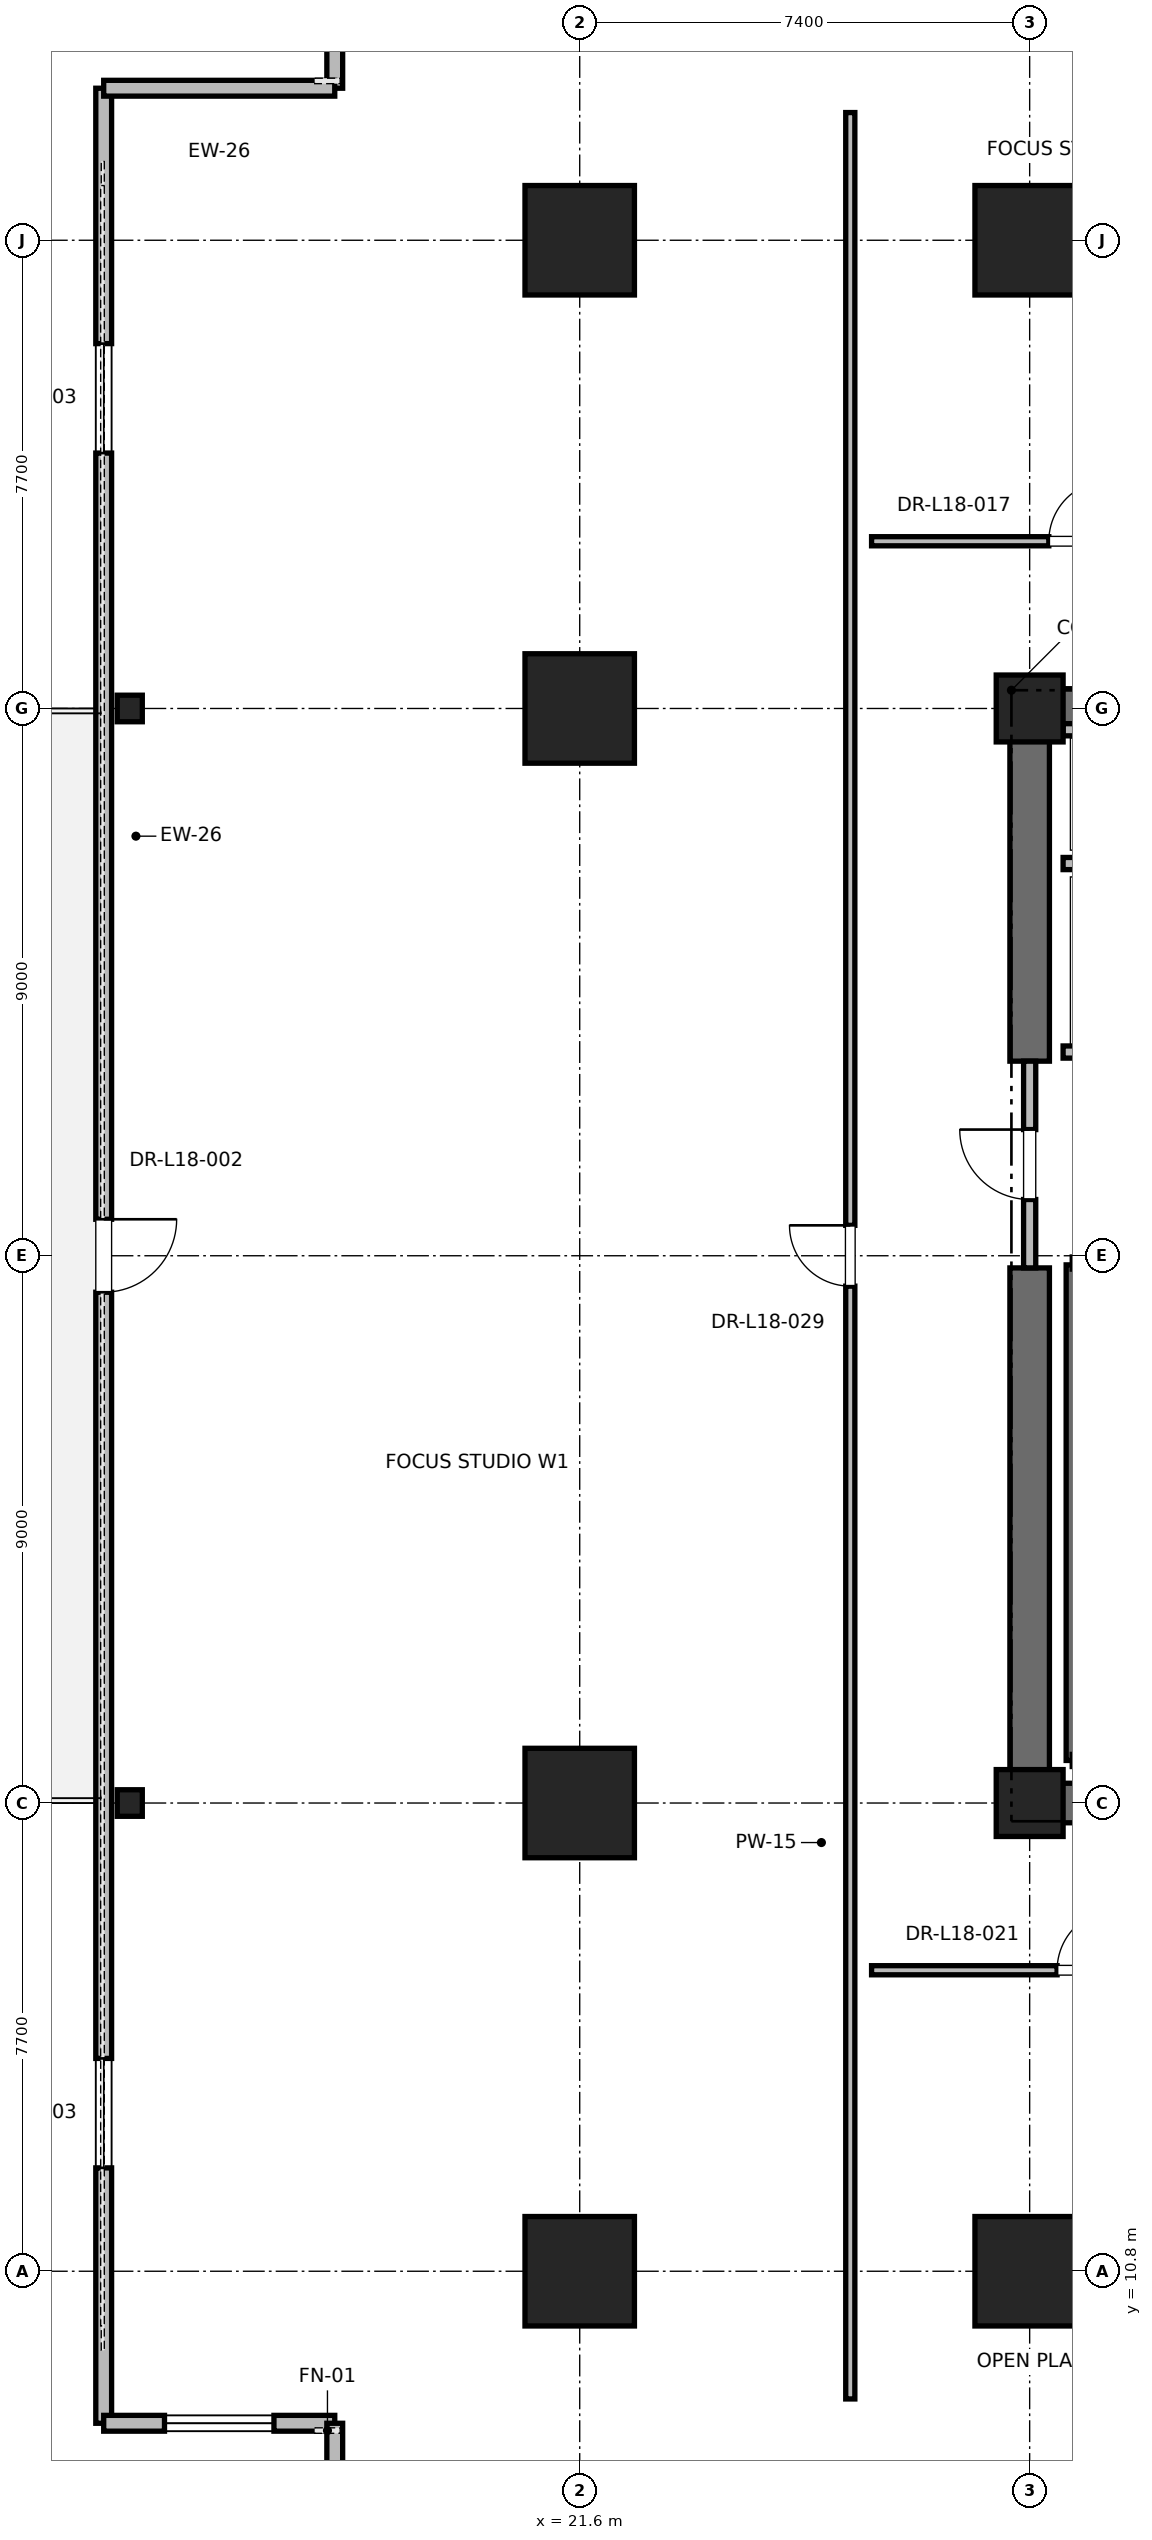
"""IFC4 building model, lengths in metres.
Left out: names, types, materials, properties, quantities, classifications, styles, units other than length and angle.
Written with IfcOpenShell. Run it as: python <this file> out.ifc"""

import sys

from ifc_helpers import new_model, si_unit, direction, frame, frame_2d, origin, origin_2d, place, context, subcontext, project, spatial, rectangle, i_section, extrude, element, fill, save


model = new_model("IFC4")
c1 = context("Model", 3, precision=1e-05, world=origin(), true_north=direction((0.0, 1.0)))
c2 = subcontext(c1, "Body", "Model", "MODEL_VIEW")
j1 = project(units=[si_unit("LENGTHUNIT", "METRE"), si_unit("PLANEANGLEUNIT", "RADIAN")], contexts=[c1])
p1 = place(None, origin())
s1 = spatial("IfcSite", under=j1, at=p1, CompositionType="ELEMENT")
p2 = place(p1, origin())
s2 = spatial("IfcBuilding", under=s1, at=p2, CompositionType="ELEMENT")
p3 = place(p2, frame((0.0, 0.0, 79.6)))
s3 = spatial("IfcBuildingStorey", under=s2, at=p3, CompositionType="ELEMENT", Elevation=79.6)
for number, where, z_axis, x_axis in (
    (1, (29.0, 10.8, 0.0), (0.0, 0.0, 1.0), (1.0, 0.0, 0.0)),
    (2, (29.0, 44.2, 0.0), (0.0, 0.0, 1.0), (1.0, 0.0, 0.0)),
    (3, (21.6, 18.5, 0.0), (0.0, 0.0, 1.0), (1.0, 0.0, 0.0)),
    (4, (21.6, 36.5, 0.0), (0.0, 0.0, 1.0), (1.0, 0.0, 0.0)),
    (5, (21.6, 10.8, 0.0), (0.0, 0.0, 1.0), (1.0, 0.0, 0.0)),
    (6, (21.6, 44.2, 0.0), (0.0, 0.0, 1.0), (1.0, 0.0, 0.0)),
):
    element("IfcColumn", number, at=place(p3, frame(where, z_axis=z_axis, x_axis=x_axis)), inside=s3, PredefinedType="COLUMN", context=c2, shape_type="SweptSolid", body=[
        extrude(rectangle(XDim=1.8, YDim=1.8, at=origin_2d()), origin(), (0.0, 0.0, 1.0), 4.0),
    ])
for number, where, z_axis, x_axis in (
    (7, (14.2, 18.5, 0.0), (0.0, 0.0, 1.0), (1.0, 0.0, 0.0)),
    (8, (14.2, 36.5, 0.0), (0.0, 0.0, 1.0), (1.0, 0.0, 0.0)),
):
    element("IfcColumn", number, at=place(p3, frame(where, z_axis=z_axis, x_axis=x_axis)), inside=s3, PredefinedType="COLUMN", context=c2, shape_type="SweptSolid", body=[
        extrude(i_section(OverallWidth=0.412, OverallDepth=0.437, WebThickness=0.036, FlangeThickness=0.058, FilletRadius=0.015, at=origin_2d()), origin(), (0.0, 0.0, 1.0), 4.0),
    ])
for number, where, z_axis, x_axis in (
    (9, (29.0, 18.5, 0.0), (0.0, 0.0, 1.0), (1.0, 0.0, 0.0)),
    (10, (29.0, 36.5, 0.0), (0.0, 0.0, 1.0), (1.0, 0.0, 0.0)),
):
    element("IfcColumn", number, at=place(p3, frame(where, z_axis=z_axis, x_axis=x_axis)), inside=s3, PredefinedType="PILASTER", context=c2, shape_type="SweptSolid", body=[
        extrude(rectangle(XDim=1.1, YDim=1.1, at=origin_2d()), origin(), (0.0, 0.0, 1.0), 4.0),
    ])
p4 = place(p3, frame((29.0, 18.5, 0.0), z_axis=(0.0, 0.0, 1.0), x_axis=(1.0, 0.0, 0.0)))
e11 = element("IfcWall", 11, at=p4, inside=s3, PredefinedType="SHEAR", context=c2, shape_type="SweptSolid", body=[
    extrude(rectangle(XDim=9.2, YDim=0.65, at=frame_2d((4.6, 0.0))), origin(), (0.0, 0.0, 1.0), 3.76),
])
p5 = place(p3, frame((29.0, 36.5, 0.0), z_axis=(0.0, 0.0, 1.0), x_axis=(1.0, 0.0, 0.0)))
e12 = element("IfcWall", 12, at=p5, inside=s3, PredefinedType="SHEAR", context=c2, shape_type="SweptSolid", body=[
    extrude(rectangle(XDim=5.8, YDim=0.65, at=frame_2d((2.9, 0.0))), origin(), (0.0, 0.0, 1.0), 3.76),
])
p6 = place(p3, frame((29.0, 18.5, 0.0), z_axis=(0.0, 0.0, 1.0), x_axis=(0.0, 1.0, 0.0)))
e13 = element("IfcWall", 13, at=p6, inside=s3, PredefinedType="SHEAR", context=c2, shape_type="SweptSolid", body=[
    extrude(rectangle(XDim=8.8, YDim=0.65, at=frame_2d((4.4, 0.0))), origin(), (0.0, 0.0, 1.0), 3.76),
])
p7 = place(p3, frame((29.0, 30.7, 0.0), z_axis=(0.0, 0.0, 1.0), x_axis=(0.0, 1.0, 0.0)))
e14 = element("IfcWall", 14, at=p7, inside=s3, PredefinedType="SHEAR", context=c2, shape_type="SweptSolid", body=[
    extrude(rectangle(XDim=5.8, YDim=0.65, at=frame_2d((2.9, 0.0))), origin(), (0.0, 0.0, 1.0), 3.76),
])
p8 = place(p3, frame((13.771, 46.7, 0.0), z_axis=(0.0, 0.0, 1.0), x_axis=(0.0, -1.0, 0.0)))
e15 = element("IfcWall", 15, at=p8, inside=s3, PredefinedType="PARAPET", context=c2, shape_type="SweptSolid", body=[
    extrude(rectangle(XDim=38.4, YDim=0.26, at=frame_2d((19.2, 0.0))), origin(), (0.0, 0.0, 1.0), 2.889),
])
p9 = place(p8, frame((4.2, 0.0, 0.85)))
e16 = element("IfcOpeningElement", 16, at=p9, cuts=e15, PredefinedType="OPENING", context=c2, shape_type="SweptSolid", body=[
    extrude(rectangle(XDim=1.8, YDim=2.2, at=frame_2d((0.9, 1.1))), frame((0.0, 0.13, 0.0), z_axis=(0.0, -1.0, 0.0), x_axis=(1.0, 0.0, 0.0)), (0.0, 0.0, 1.0), 0.26),
])
p10 = place(p8, frame((18.6, 0.0, 0.0)))
e17 = element("IfcOpeningElement", 17, at=p10, cuts=e15, PredefinedType="OPENING", context=c2, shape_type="SweptSolid", body=[
    extrude(rectangle(XDim=1.2, YDim=2.2, at=frame_2d((0.6, 1.1))), frame((0.0, 0.13, 0.0), z_axis=(0.0, -1.0, 0.0), x_axis=(1.0, 0.0, 0.0)), (0.0, 0.0, 1.0), 0.26),
])
p11 = place(p8, frame((32.4, 0.0, 0.85)))
e18 = element("IfcOpeningElement", 18, at=p11, cuts=e15, PredefinedType="OPENING", context=c2, shape_type="SweptSolid", body=[
    extrude(rectangle(XDim=1.8, YDim=2.2, at=frame_2d((0.9, 1.1))), frame((0.0, 0.13, 0.0), z_axis=(0.0, -1.0, 0.0), x_axis=(1.0, 0.0, 0.0)), (0.0, 0.0, 1.0), 0.26),
])
p12 = place(p3, frame((13.771, 8.3, 0.0), z_axis=(0.0, 0.0, 1.0), x_axis=(1.0, 0.0, 0.0)))
e19 = element("IfcWall", 19, at=p12, inside=s3, PredefinedType="PARAPET", context=c2, shape_type="SweptSolid", body=[
    extrude(rectangle(XDim=3.8, YDim=0.26, at=frame_2d((1.9, 0.0))), origin(), (0.0, 0.0, 1.0), 3.76),
])
p13 = place(p12, frame((1.0, 0.0, 0.85)))
e20 = element("IfcOpeningElement", 20, at=p13, cuts=e19, PredefinedType="OPENING", context=c2, shape_type="SweptSolid", body=[
    extrude(rectangle(XDim=1.8, YDim=2.2, at=frame_2d((0.9, 1.1))), frame((0.0, 0.13, 0.0), z_axis=(0.0, -1.0, 0.0), x_axis=(1.0, 0.0, 0.0)), (0.0, 0.0, 1.0), 0.26),
])
p14 = place(p3, frame((17.571, 8.3, 0.0), z_axis=(0.0, 0.0, 1.0), x_axis=(0.0, -1.0, 0.0)))
e21 = element("IfcWall", 21, at=p14, inside=s3, PredefinedType="PARAPET", context=c2, shape_type="SweptSolid", body=[
    extrude(rectangle(XDim=3.4, YDim=0.26, at=frame_2d((1.7, 0.0))), origin(), (0.0, 0.0, 1.0), 3.76),
])
p15 = place(p3, frame((17.571, 50.1, 0.0), z_axis=(0.0, 0.0, 1.0), x_axis=(0.0, -1.0, 0.0)))
e22 = element("IfcWall", 22, at=p15, inside=s3, PredefinedType="PARAPET", context=c2, shape_type="SweptSolid", body=[
    extrude(rectangle(XDim=3.4, YDim=0.26, at=frame_2d((1.7, 0.0))), origin(), (0.0, 0.0, 1.0), 3.76),
])
p16 = place(p15, frame((0.8, 0.0, 0.85)))
e23 = element("IfcOpeningElement", 23, at=p16, cuts=e22, PredefinedType="OPENING", context=c2, shape_type="SweptSolid", body=[
    extrude(rectangle(XDim=1.8, YDim=2.2, at=frame_2d((0.9, 1.1))), frame((0.0, 0.13, 0.0), z_axis=(0.0, -1.0, 0.0), x_axis=(1.0, 0.0, 0.0)), (0.0, 0.0, 1.0), 0.26),
])
p17 = place(p3, frame((17.571, 46.7, 0.0), z_axis=(0.0, 0.0, 1.0), x_axis=(-1.0, 0.0, 0.0)))
e24 = element("IfcWall", 24, at=p17, inside=s3, PredefinedType="PARAPET", context=c2, shape_type="SweptSolid", body=[
    extrude(rectangle(XDim=3.8, YDim=0.26, at=frame_2d((1.9, 0.0))), origin(), (0.0, 0.0, 1.0), 3.76),
])
p18 = place(p3, frame((29.7, 19.2, 0.0), z_axis=(0.0, 0.0, 1.0), x_axis=(0.0, 1.0, 0.0)))
e25 = element("IfcWall", 25, at=p18, inside=s3, PredefinedType="SOLIDWALL", context=c2, shape_type="SweptSolid", body=[
    extrude(rectangle(XDim=8.15, YDim=0.2, at=frame_2d((4.075, 0.0))), origin(), (0.0, 0.0, 1.0), 3.76),
])
p19 = place(p3, frame((29.0, 27.3, 0.0), z_axis=(0.0, 0.0, 1.0), x_axis=(0.0, 1.0, 0.0)))
e26 = element("IfcWall", 26, at=p19, inside=s3, PredefinedType="PARTITIONING", context=c2, shape_type="SweptSolid", body=[
    extrude(rectangle(XDim=3.4, YDim=0.2, at=frame_2d((1.7, 0.0))), origin(), (0.0, 0.0, 1.0), 2.54),
])
p20 = place(p19, frame((1.125, 0.0, 0.0)))
e27 = element("IfcOpeningElement", 27, at=p20, cuts=e26, PredefinedType="OPENING", context=c2, shape_type="SweptSolid", body=[
    extrude(rectangle(XDim=1.15, YDim=2.2, at=frame_2d((0.575, 1.1))), frame((0.0, 0.1, 0.0), z_axis=(0.0, -1.0, 0.0), x_axis=(1.0, 0.0, 0.0)), (0.0, 0.0, 1.0), 0.2),
])
p21 = place(p3, frame((29.55, 30.85, 0.0), z_axis=(0.0, 0.0, 1.0), x_axis=(1.0, 0.0, 0.0)))
e28 = element("IfcWall", 28, at=p21, inside=s3, PredefinedType="SOLIDWALL", context=c2, shape_type="SweptSolid", body=[
    extrude(rectangle(XDim=2.6, YDim=0.2, at=frame_2d((1.3, 0.0))), origin(), (0.0, 0.0, 1.0), 2.54),
])
p22 = place(p21, frame((0.75, 0.0, 0.0)))
e29 = element("IfcOpeningElement", 29, at=p22, cuts=e28, PredefinedType="OPENING", context=c2, shape_type="SweptSolid", body=[
    extrude(rectangle(XDim=1.1, YDim=2.2, at=frame_2d((0.55, 1.1))), frame((0.0, 0.1, 0.0), z_axis=(0.0, -1.0, 0.0), x_axis=(1.0, 0.0, 0.0)), (0.0, 0.0, 1.0), 0.2),
])
p23 = place(p3, frame((29.55, 33.95, 0.0), z_axis=(0.0, 0.0, 1.0), x_axis=(1.0, 0.0, 0.0)))
e30 = element("IfcWall", 30, at=p23, inside=s3, PredefinedType="SOLIDWALL", context=c2, shape_type="SweptSolid", body=[
    extrude(rectangle(XDim=2.8, YDim=0.2, at=frame_2d((1.4, 0.0))), origin(), (0.0, 0.0, 1.0), 3.76),
])
p24 = place(p3, frame((32.35, 36.15, 0.0), z_axis=(0.0, 0.0, 1.0), x_axis=(-1.0, 0.0, 0.0)))
e31 = element("IfcWall", 31, at=p24, inside=s3, PredefinedType="SOLIDWALL", context=c2, shape_type="SweptSolid", body=[
    extrude(rectangle(XDim=2.8, YDim=0.2, at=frame_2d((1.4, 0.0))), origin(), (0.0, 0.0, 1.0), 2.889),
])
p25 = place(p3, frame((26.4, 39.25, 0.0), z_axis=(0.0, 0.0, 1.0), x_axis=(1.0, 0.0, 0.0)))
e32 = element("IfcWall", 32, at=p25, inside=s3, PredefinedType="PARTITIONING", context=c2, shape_type="SweptSolid", body=[
    extrude(rectangle(XDim=6.8, YDim=0.15, at=frame_2d((3.4, 0.0))), origin(), (0.0, 0.0, 1.0), 2.85),
])
p26 = place(p25, frame((2.915, 0.0, 0.0)))
e33 = element("IfcOpeningElement", 33, at=p26, cuts=e32, PredefinedType="OPENING", context=c2, shape_type="SweptSolid", body=[
    extrude(rectangle(XDim=1.0, YDim=2.15, at=frame_2d((0.5, 1.075))), frame((0.0, 0.075, 0.0), z_axis=(0.0, -1.0, 0.0), x_axis=(1.0, 0.0, 0.0)), (0.0, 0.0, 1.0), 0.15),
])
p27 = place(p3, frame((26.4, 15.75, 0.0), z_axis=(0.0, 0.0, 1.0), x_axis=(1.0, 0.0, 0.0)))
e34 = element("IfcWall", 34, at=p27, inside=s3, PredefinedType="PARTITIONING", context=c2, shape_type="SweptSolid", body=[
    extrude(rectangle(XDim=7.072, YDim=0.15, at=frame_2d((3.536, 0.0))), origin(), (0.0, 0.0, 1.0), 2.85),
])
p28 = place(p27, frame((3.051, 0.0, 0.0)))
e35 = element("IfcOpeningElement", 35, at=p28, cuts=e34, PredefinedType="OPENING", context=c2, shape_type="SweptSolid", body=[
    extrude(rectangle(XDim=1.0, YDim=2.15, at=frame_2d((0.5, 1.075))), frame((0.0, 0.075, 0.0), z_axis=(0.0, -1.0, 0.0), x_axis=(1.0, 0.0, 0.0)), (0.0, 0.0, 1.0), 0.15),
])
p29 = place(p3, frame((26.05, 8.7, 0.0), z_axis=(0.0, 0.0, 1.0), x_axis=(0.0, 1.0, 0.0)))
e36 = element("IfcWall", 36, at=p29, inside=s3, PredefinedType="PARTITIONING", context=c2, shape_type="SweptSolid", body=[
    extrude(rectangle(XDim=37.6, YDim=0.15, at=frame_2d((18.8, 0.0))), origin(), (0.0, 0.0, 1.0), 2.85),
])
p30 = place(p29, frame((18.3, 0.0, 0.0)))
e37 = element("IfcOpeningElement", 37, at=p30, cuts=e36, PredefinedType="OPENING", context=c2, shape_type="SweptSolid", body=[
    extrude(rectangle(XDim=1.0, YDim=2.15, at=frame_2d((0.5, 1.075))), frame((0.0, 0.075, 0.0), z_axis=(0.0, -1.0, 0.0), x_axis=(1.0, 0.0, 0.0)), (0.0, 0.0, 1.0), 0.15),
])
p31 = place(p9, origin())
e38 = element("IfcWindow", 38, at=p31, inside=s3, PartitioningType="SINGLE_PANEL", PredefinedType="WINDOW", context=c2, shape_type="SweptSolid", body=[
    extrude(rectangle(XDim=1.8, YDim=2.2, at=frame_2d((0.9, 1.1))), frame((0.0, 0.03, 0.0), z_axis=(0.0, -1.0, 0.0), x_axis=(1.0, 0.0, 0.0)), (0.0, 0.0, 1.0), 0.06),
])
fill(e16, e38)
p32 = place(p10, origin())
e39 = element("IfcDoor", 39, at=p32, inside=s3, OperationType="SINGLE_SWING_LEFT", PredefinedType="DOOR", context=c2, shape_type="SweptSolid", body=[
    extrude(rectangle(XDim=1.2, YDim=2.2, at=frame_2d((0.6, 1.1))), frame((0.0, 0.025, 0.0), z_axis=(0.0, -1.0, 0.0), x_axis=(1.0, 0.0, 0.0)), (0.0, 0.0, 1.0), 0.05),
])
fill(e17, e39)
p33 = place(p11, origin())
e40 = element("IfcWindow", 40, at=p33, inside=s3, PartitioningType="SINGLE_PANEL", PredefinedType="WINDOW", context=c2, shape_type="SweptSolid", body=[
    extrude(rectangle(XDim=1.8, YDim=2.2, at=frame_2d((0.9, 1.1))), frame((0.0, 0.03, 0.0), z_axis=(0.0, -1.0, 0.0), x_axis=(1.0, 0.0, 0.0)), (0.0, 0.0, 1.0), 0.06),
])
fill(e18, e40)
p34 = place(p13, origin())
e41 = element("IfcWindow", 41, at=p34, inside=s3, PartitioningType="SINGLE_PANEL", PredefinedType="WINDOW", context=c2, shape_type="SweptSolid", body=[
    extrude(rectangle(XDim=1.8, YDim=2.2, at=frame_2d((0.9, 1.1))), frame((0.0, 0.03, 0.0), z_axis=(0.0, -1.0, 0.0), x_axis=(1.0, 0.0, 0.0)), (0.0, 0.0, 1.0), 0.06),
])
fill(e20, e41)
p35 = place(p20, origin())
e42 = element("IfcDoor", 42, at=p35, inside=s3, OperationType="SINGLE_SWING_RIGHT", PredefinedType="DOOR", context=c2, shape_type="SweptSolid", body=[
    extrude(rectangle(XDim=1.15, YDim=2.2, at=frame_2d((0.575, 1.1))), frame((0.0, 0.025, 0.0), z_axis=(0.0, -1.0, 0.0), x_axis=(1.0, 0.0, 0.0)), (0.0, 0.0, 1.0), 0.05),
])
fill(e27, e42)
p36 = place(p26, origin())
e43 = element("IfcDoor", 43, at=p36, inside=s3, OperationType="SINGLE_SWING_RIGHT", PredefinedType="DOOR", context=c2, shape_type="SweptSolid", body=[
    extrude(rectangle(XDim=1.0, YDim=2.15, at=frame_2d((0.5, 1.075))), frame((0.0, 0.025, 0.0), z_axis=(0.0, -1.0, 0.0), x_axis=(1.0, 0.0, 0.0)), (0.0, 0.0, 1.0), 0.05),
])
fill(e33, e43)
p37 = place(p28, origin())
e44 = element("IfcDoor", 44, at=p37, inside=s3, OperationType="SINGLE_SWING_RIGHT", PredefinedType="DOOR", context=c2, shape_type="SweptSolid", body=[
    extrude(rectangle(XDim=1.0, YDim=2.15, at=frame_2d((0.5, 1.075))), frame((0.0, 0.025, 0.0), z_axis=(0.0, -1.0, 0.0), x_axis=(1.0, 0.0, 0.0)), (0.0, 0.0, 1.0), 0.05),
])
fill(e35, e44)
p38 = place(p30, origin())
e45 = element("IfcDoor", 45, at=p38, inside=s3, OperationType="SINGLE_SWING_RIGHT", PredefinedType="DOOR", context=c2, shape_type="SweptSolid", body=[
    extrude(rectangle(XDim=1.0, YDim=2.15, at=frame_2d((0.5, 1.075))), frame((0.0, 0.025, 0.0), z_axis=(0.0, -1.0, 0.0), x_axis=(1.0, 0.0, 0.0)), (0.0, 0.0, 1.0), 0.05),
])
fill(e37, e45)
save(model, sys.argv[1])
